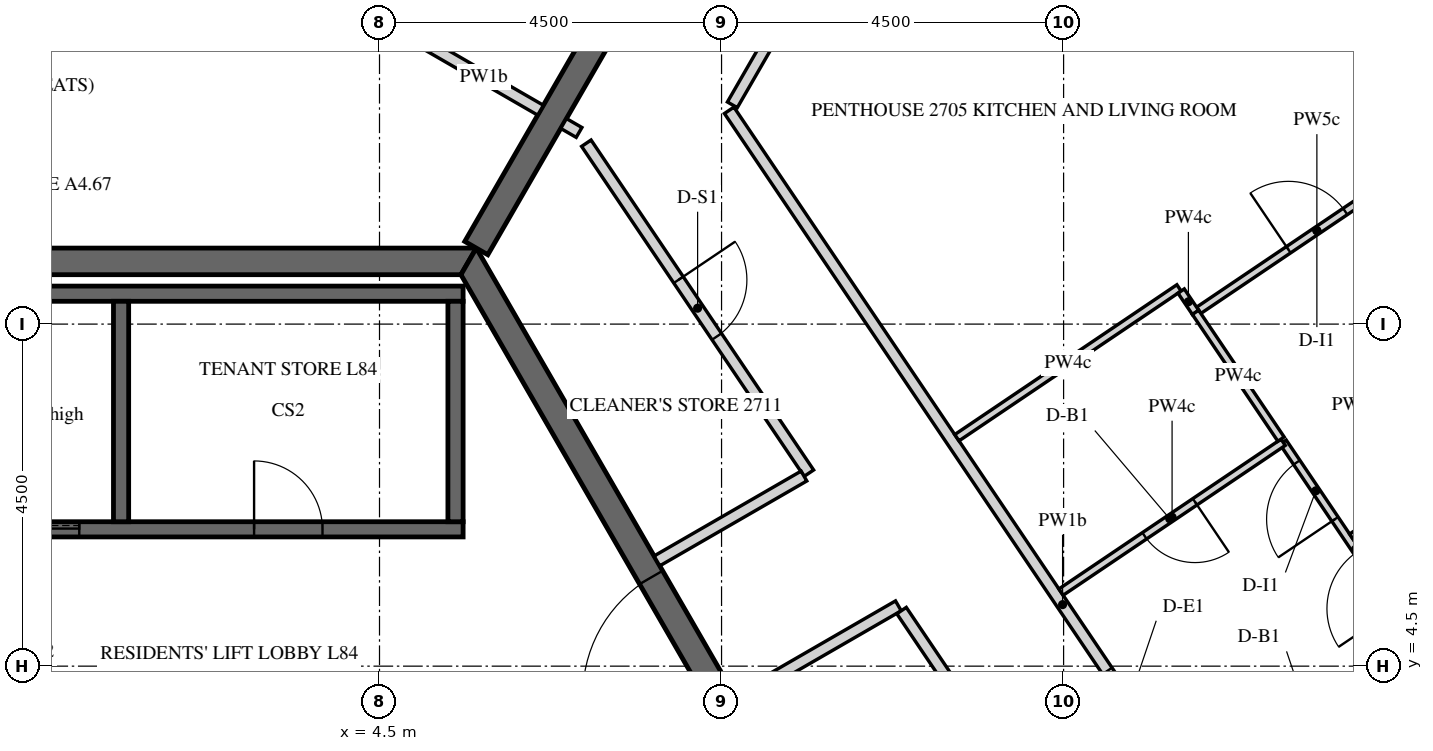
"""IFC4 building model, lengths in metres.
Left out: names, types, materials, properties, quantities, classifications, styles, units other than length and angle.
Written with IfcOpenShell. Run it as: python <this file> out.ifc"""

import sys

from ifc_helpers import new_model, si_unit, direction, frame, frame_2d, origin, place, context, subcontext, project, spatial, polyline, rectangle, outline, extrude, element, fill, save


model = new_model("IFC4")
c1 = context("Model", 3, precision=1e-05, world=origin(), true_north=direction((0.0, 1.0)))
c2 = subcontext(c1, "Body", "Model", "MODEL_VIEW")
j1 = project(units=[si_unit("LENGTHUNIT", "METRE"), si_unit("PLANEANGLEUNIT", "RADIAN")], contexts=[c1])
p1 = place(None, origin())
s1 = spatial("IfcSite", under=j1, at=p1, CompositionType="ELEMENT")
p2 = place(p1, origin())
s2 = spatial("IfcBuilding", under=s1, at=p2, CompositionType="ELEMENT")
p3 = place(p2, frame((0.0, 0.0, 349.5)))
s3 = spatial("IfcBuildingStorey", under=s2, at=p3, CompositionType="ELEMENT", Elevation=349.5)
p4 = place(p3, frame((24.37, 2.811, 0.0), z_axis=(0.0, 0.0, 1.0), x_axis=(-0.559187034749, 0.829041531027, 0.0)))
e1 = element("IfcWall", 1, at=p4, inside=s3, PredefinedType="SOLIDWALL", context=c2, shape_type="SweptSolid", body=[
    extrude(outline(polyline([(0.225, -0.225), (20.506, -0.225), (20.957, 0.225), (-0.225, 0.225), (0.225, -0.225)])), origin(), (0.0, 0.0, 1.0), 3.75),
])
p5 = place(p4, frame((0.325, 0.0, 0.9)))
e2 = element("IfcOpeningElement", 2, at=p5, cuts=e1, PredefinedType="OPENING", context=c2, shape_type="SweptSolid", body=[
    extrude(rectangle(XDim=0.9, YDim=1.5, at=frame_2d((0.45, 0.75))), frame((0.0, 0.235, 0.0), z_axis=(0.0, -1.0, 0.0), x_axis=(1.0, 0.0, 0.0)), (0.0, 0.0, 1.0), 0.47),
])
p6 = place(p4, frame((1.525, 0.0, 0.0)))
e3 = element("IfcOpeningElement", 3, at=p6, cuts=e1, PredefinedType="OPENING", context=c2, shape_type="SweptSolid", body=[
    extrude(rectangle(XDim=1.2, YDim=2.4, at=frame_2d((0.6, 1.2))), frame((0.0, 0.235, 0.0), z_axis=(0.0, -1.0, 0.0), x_axis=(1.0, 0.0, 0.0)), (0.0, 0.0, 1.0), 0.47),
])
p7 = place(p4, frame((3.766, 0.0, 0.9)))
e4 = element("IfcOpeningElement", 4, at=p7, cuts=e1, PredefinedType="OPENING", context=c2, shape_type="SweptSolid", body=[
    extrude(rectangle(XDim=0.9, YDim=1.5, at=frame_2d((0.45, 0.75))), frame((0.0, 0.235, 0.0), z_axis=(0.0, -1.0, 0.0), x_axis=(1.0, 0.0, 0.0)), (0.0, 0.0, 1.0), 0.47),
])
p8 = place(p4, frame((4.966, 0.0, 0.0)))
e5 = element("IfcOpeningElement", 5, at=p8, cuts=e1, PredefinedType="OPENING", context=c2, shape_type="SweptSolid", body=[
    extrude(rectangle(XDim=1.2, YDim=2.4, at=frame_2d((0.6, 1.2))), frame((0.0, 0.235, 0.0), z_axis=(0.0, -1.0, 0.0), x_axis=(1.0, 0.0, 0.0)), (0.0, 0.0, 1.0), 0.47),
])
p9 = place(p4, frame((7.366, 0.0, 0.9)))
e6 = element("IfcOpeningElement", 6, at=p9, cuts=e1, PredefinedType="OPENING", context=c2, shape_type="SweptSolid", body=[
    extrude(rectangle(XDim=0.9, YDim=1.5, at=frame_2d((0.45, 0.75))), frame((0.0, 0.235, 0.0), z_axis=(0.0, -1.0, 0.0), x_axis=(1.0, 0.0, 0.0)), (0.0, 0.0, 1.0), 0.47),
])
p10 = place(p4, frame((8.566, 0.0, 0.0)))
e7 = element("IfcOpeningElement", 7, at=p10, cuts=e1, PredefinedType="OPENING", context=c2, shape_type="SweptSolid", body=[
    extrude(rectangle(XDim=1.2, YDim=2.4, at=frame_2d((0.6, 1.2))), frame((0.0, 0.235, 0.0), z_axis=(0.0, -1.0, 0.0), x_axis=(1.0, 0.0, 0.0)), (0.0, 0.0, 1.0), 0.47),
])
p11 = place(p4, frame((10.966, 0.0, 0.9)))
e8 = element("IfcOpeningElement", 8, at=p11, cuts=e1, PredefinedType="OPENING", context=c2, shape_type="SweptSolid", body=[
    extrude(rectangle(XDim=0.9, YDim=1.5, at=frame_2d((0.45, 0.75))), frame((0.0, 0.235, 0.0), z_axis=(0.0, -1.0, 0.0), x_axis=(1.0, 0.0, 0.0)), (0.0, 0.0, 1.0), 0.47),
])
p12 = place(p4, frame((12.166, 0.0, 0.0)))
e9 = element("IfcOpeningElement", 9, at=p12, cuts=e1, PredefinedType="OPENING", context=c2, shape_type="SweptSolid", body=[
    extrude(rectangle(XDim=1.2, YDim=2.4, at=frame_2d((0.6, 1.2))), frame((0.0, 0.235, 0.0), z_axis=(0.0, -1.0, 0.0), x_axis=(1.0, 0.0, 0.0)), (0.0, 0.0, 1.0), 0.47),
])
p13 = place(p4, frame((14.566, 0.0, 0.9)))
e10 = element("IfcOpeningElement", 10, at=p13, cuts=e1, PredefinedType="OPENING", context=c2, shape_type="SweptSolid", body=[
    extrude(rectangle(XDim=0.9, YDim=1.5, at=frame_2d((0.45, 0.75))), frame((0.0, 0.235, 0.0), z_axis=(0.0, -1.0, 0.0), x_axis=(1.0, 0.0, 0.0)), (0.0, 0.0, 1.0), 0.47),
])
p14 = place(p4, frame((15.766, 0.0, 0.0)))
e11 = element("IfcOpeningElement", 11, at=p14, cuts=e1, PredefinedType="OPENING", context=c2, shape_type="SweptSolid", body=[
    extrude(rectangle(XDim=1.2, YDim=2.4, at=frame_2d((0.6, 1.2))), frame((0.0, 0.235, 0.0), z_axis=(0.0, -1.0, 0.0), x_axis=(1.0, 0.0, 0.0)), (0.0, 0.0, 1.0), 0.47),
])
p15 = place(p4, frame((18.007, 0.0, 0.9)))
e12 = element("IfcOpeningElement", 12, at=p15, cuts=e1, PredefinedType="OPENING", context=c2, shape_type="SweptSolid", body=[
    extrude(rectangle(XDim=0.9, YDim=1.5, at=frame_2d((0.45, 0.75))), frame((0.0, 0.235, 0.0), z_axis=(0.0, -1.0, 0.0), x_axis=(1.0, 0.0, 0.0)), (0.0, 0.0, 1.0), 0.47),
])
p16 = place(p4, frame((19.207, 0.0, 0.0)))
e13 = element("IfcOpeningElement", 13, at=p16, cuts=e1, PredefinedType="OPENING", context=c2, shape_type="SweptSolid", body=[
    extrude(rectangle(XDim=1.2, YDim=2.4, at=frame_2d((0.6, 1.2))), frame((0.0, 0.235, 0.0), z_axis=(0.0, -1.0, 0.0), x_axis=(1.0, 0.0, 0.0)), (0.0, 0.0, 1.0), 0.47),
])
p17 = place(p3, frame((11.345, 0.0, 0.0), z_axis=(0.0, 0.0, 1.0), x_axis=(-0.499995046907, 0.866028263435, 0.0)))
e14 = element("IfcWall", 14, at=p17, inside=s3, PredefinedType="SHEAR", context=c2, shape_type="SweptSolid", body=[
    extrude(outline(polyline([(-0.101, -0.175), (11.446, -0.175), (11.244, 0.175), (0.101, 0.175), (-0.101, -0.175)])), origin(), (0.0, 0.0, 1.0), 3.75),
])
p18 = place(p17, frame((4.744, 0.0, 0.0)))
e15 = element("IfcOpeningElement", 15, at=p18, cuts=e14, PredefinedType="OPENING", context=c2, shape_type="SweptSolid", body=[
    extrude(rectangle(XDim=1.8, YDim=2.4, at=frame_2d((0.9, 1.2))), frame((0.0, 0.185, 0.0), z_axis=(0.0, -1.0, 0.0), x_axis=(1.0, 0.0, 0.0)), (0.0, 0.0, 1.0), 0.37),
])
p19 = place(p3, frame((5.673, 9.825, 0.0), z_axis=(0.0, 0.0, 1.0), x_axis=(-1.0, 0.0, 0.0)))
e16 = element("IfcWall", 16, at=p19, inside=s3, PredefinedType="SHEAR", context=c2, shape_type="SweptSolid", body=[
    extrude(outline(polyline([(-0.101, -0.175), (11.446, -0.175), (11.244, 0.175), (0.101, 0.175), (-0.101, -0.175)])), origin(), (0.0, 0.0, 1.0), 3.75),
])
p20 = place(p3, frame((5.773, 10.0, 0.0), z_axis=(0.0, 0.0, 1.0), x_axis=(0.500007911273, 0.866020836161, 0.0)))
e17 = element("IfcWall", 17, at=p20, inside=s3, PredefinedType="SHEAR", context=c2, shape_type="SweptSolid", body=[
    extrude(rectangle(XDim=14.51, YDim=0.35, at=frame_2d((7.255, 0.0))), origin(), (0.0, 0.0, 1.0), 3.75),
])
p21 = place(p20, frame((6.355, 0.0, 0.0)))
e18 = element("IfcOpeningElement", 18, at=p21, cuts=e17, PredefinedType="OPENING", context=c2, shape_type="SweptSolid", body=[
    extrude(rectangle(XDim=1.8, YDim=2.4, at=frame_2d((0.9, 1.2))), frame((0.0, 0.185, 0.0), z_axis=(0.0, -1.0, 0.0), x_axis=(1.0, 0.0, 0.0)), (0.0, 0.0, 1.0), 0.37),
])
p22 = place(p3, frame((-5.6, 6.3, -0.5), z_axis=(0.0, 0.0, 1.0), x_axis=(1.0, 0.0, 0.0)))
e19 = element("IfcWall", 19, at=p22, inside=s3, PredefinedType="SHEAR", context=c2, shape_type="SweptSolid", body=[
    extrude(rectangle(XDim=11.2, YDim=0.2, at=frame_2d((5.6, 0.0))), origin(), (0.0, 0.0, 1.0), 4.15),
])
p23 = place(p22, frame((8.45, 0.0, 0.5)))
e20 = element("IfcOpeningElement", 20, at=p23, cuts=e19, PredefinedType="OPENING", context=c2, shape_type="SweptSolid", body=[
    extrude(rectangle(XDim=0.9, YDim=2.1, at=frame_2d((0.45, 1.05))), frame((0.0, 0.11, 0.0), z_axis=(0.0, -1.0, 0.0), x_axis=(1.0, 0.0, 0.0)), (0.0, 0.0, 1.0), 0.22),
])
p24 = place(p22, frame((0.65, 0.0, 0.5)))
e21 = element("IfcOpeningElement", 21, at=p24, cuts=e19, PredefinedType="OPENING", context=c2, shape_type="SweptSolid", body=[
    extrude(rectangle(XDim=1.1, YDim=2.1, at=frame_2d((0.55, 1.05))), frame((0.0, 0.11, 0.0), z_axis=(0.0, -1.0, 0.0), x_axis=(1.0, 0.0, 0.0)), (0.0, 0.0, 1.0), 0.22),
])
p25 = place(p22, frame((2.85, 0.0, 0.5)))
e22 = element("IfcOpeningElement", 22, at=p25, cuts=e19, PredefinedType="OPENING", context=c2, shape_type="SweptSolid", body=[
    extrude(rectangle(XDim=1.1, YDim=2.1, at=frame_2d((0.55, 1.05))), frame((0.0, 0.11, 0.0), z_axis=(0.0, -1.0, 0.0), x_axis=(1.0, 0.0, 0.0)), (0.0, 0.0, 1.0), 0.22),
])
p26 = place(p22, frame((5.05, 0.0, 0.5)))
e23 = element("IfcOpeningElement", 23, at=p26, cuts=e19, PredefinedType="OPENING", context=c2, shape_type="SweptSolid", body=[
    extrude(rectangle(XDim=1.1, YDim=2.1, at=frame_2d((0.55, 1.05))), frame((0.0, 0.11, 0.0), z_axis=(0.0, -1.0, 0.0), x_axis=(1.0, 0.0, 0.0)), (0.0, 0.0, 1.0), 0.22),
])
p27 = place(p3, frame((-5.6, 9.4, -0.5), z_axis=(0.0, 0.0, 1.0), x_axis=(1.0, 0.0, 0.0)))
e24 = element("IfcWall", 24, at=p27, inside=s3, PredefinedType="SHEAR", context=c2, shape_type="SweptSolid", body=[
    extrude(rectangle(XDim=11.2, YDim=0.2, at=frame_2d((5.6, 0.0))), origin(), (0.0, 0.0, 1.0), 4.15),
])
for number, where, z_axis, x_axis in (
    (25, (1.1, 6.4, -0.5), (0.0, 0.0, 1.0), (0.0, 1.0, 0.0)),
    (26, (5.5, 6.4, -0.5), (0.0, 0.0, 1.0), (0.0, 1.0, 0.0)),
):
    element("IfcWall", number, at=place(p3, frame(where, z_axis=z_axis, x_axis=x_axis)), inside=s3, PredefinedType="SHEAR", context=c2, shape_type="SweptSolid", body=[
        extrude(rectangle(XDim=2.9, YDim=0.2, at=frame_2d((1.45, 0.0))), origin(), (0.0, 0.0, 1.0), 4.15),
    ])
p28 = place(p3, frame((5.125, 12.677, 0.0), z_axis=(0.0, 0.0, 1.0), x_axis=(0.866013532718, -0.500020560727, 0.0)))
e27 = element("IfcWall", 27, at=p28, inside=s3, PredefinedType="PARTITIONING", context=c2, shape_type="SweptSolid", body=[
    extrude(rectangle(XDim=1.725, YDim=0.15, at=frame_2d((0.863, 0.0))), origin(), (0.0, 0.0, 1.0), 2.82),
])
p29 = place(p3, frame((17.873, -1.193, 0.0), z_axis=(0.0, 0.0, 1.0), x_axis=(-0.559195650252, 0.829035719821, 0.0)))
e28 = element("IfcWall", 28, at=p29, inside=s3, PredefinedType="PARTITIONING", context=c2, shape_type="SweptSolid", body=[
    extrude(rectangle(XDim=15.688, YDim=0.15, at=frame_2d((7.844, 0.0))), origin(), (0.0, 0.0, 1.0), 2.82),
])
p30 = place(p29, frame((5.792, 0.0, 0.0)))
e29 = element("IfcOpeningElement", 29, at=p30, cuts=e28, PredefinedType="OPENING", context=c2, shape_type="SweptSolid", body=[
    extrude(rectangle(XDim=1.0, YDim=2.1, at=frame_2d((0.5, 1.05))), frame((0.0, 0.085, 0.0), z_axis=(0.0, -1.0, 0.0), x_axis=(1.0, 0.0, 0.0)), (0.0, 0.0, 1.0), 0.17),
])
p31 = place(p3, frame((9.142, 11.885, 0.0), z_axis=(0.0, 0.0, 1.0), x_axis=(0.500004822225, 0.866022619654, 0.0)))
e30 = element("IfcWall", 30, at=p31, inside=s3, PredefinedType="PARTITIONING", context=c2, shape_type="SweptSolid", body=[
    extrude(rectangle(XDim=5.339, YDim=0.15, at=frame_2d((2.669, 0.0))), origin(), (0.0, 0.0, 1.0), 2.82),
])
p32 = place(p3, frame((9.2, 4.066, 0.0), z_axis=(0.0, 0.0, 1.0), x_axis=(0.866038240688, 0.499977765172, 0.0)))
e31 = element("IfcWall", 31, at=p32, inside=s3, PredefinedType="PARTITIONING", context=c2, shape_type="SweptSolid", body=[
    extrude(rectangle(XDim=2.456, YDim=0.15, at=frame_2d((1.228, 0.0))), origin(), (0.0, 0.0, 1.0), 2.82),
])
p33 = place(p3, frame((11.368, 5.231, 0.0), z_axis=(0.0, 0.0, 1.0), x_axis=(0.55919388604, -0.829036909803, 0.0)))
e32 = element("IfcWall", 32, at=p33, inside=s3, PredefinedType="PARTITIONING", context=c2, shape_type="SweptSolid", body=[
    extrude(rectangle(XDim=7.922, YDim=0.15, at=frame_2d((3.961, 0.0))), origin(), (0.0, 0.0, 1.0), 2.82),
])
p34 = place(p33, frame((3.511, 0.0, 0.0)))
e33 = element("IfcOpeningElement", 33, at=p34, cuts=e32, PredefinedType="OPENING", context=c2, shape_type="SweptSolid", body=[
    extrude(rectangle(XDim=0.9, YDim=2.1, at=frame_2d((0.45, 1.05))), frame((0.0, 0.085, 0.0), z_axis=(0.0, -1.0, 0.0), x_axis=(1.0, 0.0, 0.0)), (0.0, 0.0, 1.0), 0.17),
])
p35 = place(p3, frame((6.922, 11.639, 0.0), z_axis=(0.0, 0.0, 1.0), x_axis=(0.866254745882, -0.499602557277, 0.0)))
e34 = element("IfcWall", 34, at=p35, inside=s3, PredefinedType="PARTITIONING", context=c2, shape_type="SweptSolid", body=[
    extrude(rectangle(XDim=0.235, YDim=0.15, at=frame_2d((0.118, 0.0))), origin(), (0.0, 0.0, 1.0), 2.82),
])
p36 = place(p3, frame((7.221, 11.38, 0.0), z_axis=(0.0, 0.0, 1.0), x_axis=(0.559200548931, -0.829032415576, 0.0)))
e35 = element("IfcWall", 35, at=p36, inside=s3, PredefinedType="PARTITIONING", context=c2, shape_type="SweptSolid", body=[
    extrude(rectangle(XDim=5.236, YDim=0.15, at=frame_2d((2.618, 0.0))), origin(), (0.0, 0.0, 1.0), 2.82),
])
p37 = place(p36, frame((2.168, 0.0, 0.0)))
e36 = element("IfcOpeningElement", 36, at=p37, cuts=e35, PredefinedType="OPENING", context=c2, shape_type="SweptSolid", body=[
    extrude(rectangle(XDim=0.9, YDim=2.1, at=frame_2d((0.45, 1.05))), frame((0.0, 0.085, 0.0), z_axis=(0.0, -1.0, 0.0), x_axis=(1.0, 0.0, 0.0)), (0.0, 0.0, 1.0), 0.17),
])
p38 = place(p3, frame((10.084, 7.001, 0.0), z_axis=(0.0, 0.0, 1.0), x_axis=(-0.865994457699, -0.500053596362, 0.0)))
e37 = element("IfcWall", 37, at=p38, inside=s3, PredefinedType="PARTITIONING", context=c2, shape_type="SweptSolid", body=[
    extrude(rectangle(XDim=2.234, YDim=0.15, at=frame_2d((1.117, 0.0))), origin(), (0.0, 0.0, 1.0), 2.82),
])
p39 = place(p3, frame((15.278, 9.181, 0.0), z_axis=(0.0, 0.0, 1.0), x_axis=(0.829043350963, 0.559184336534, 0.0)))
e38 = element("IfcWall", 38, at=p39, inside=s3, PredefinedType="PARTITIONING", context=c2, shape_type="SweptSolid", body=[
    extrude(rectangle(XDim=3.75, YDim=0.1, at=frame_2d((1.875, 0.0))), origin(), (0.0, 0.0, 1.0), 2.82),
])
p40 = place(p39, frame((1.425, 0.0, 0.0)))
e39 = element("IfcOpeningElement", 39, at=p40, cuts=e38, PredefinedType="OPENING", context=c2, shape_type="SweptSolid", body=[
    extrude(rectangle(XDim=0.9, YDim=2.1, at=frame_2d((0.45, 1.05))), frame((0.0, 0.06, 0.0), z_axis=(0.0, -1.0, 0.0), x_axis=(1.0, 0.0, 0.0)), (0.0, 0.0, 1.0), 0.12),
])
p41 = place(p3, frame((12.096, 7.505, 0.0), z_axis=(0.0, 0.0, 1.0), x_axis=(0.829065408555, 0.559151632687, 0.0)))
e40 = element("IfcWall", 40, at=p41, inside=s3, PredefinedType="PARTITIONING", context=c2, shape_type="SweptSolid", body=[
    extrude(rectangle(XDim=3.525, YDim=0.1, at=frame_2d((1.762, 0.0))), origin(), (0.0, 0.0, 1.0), 2.82),
])
p42 = place(p3, frame((15.046, 9.435, 0.0), z_axis=(0.0, 0.0, 1.0), x_axis=(0.559141668278, -0.829072128826, 0.0)))
e41 = element("IfcWall", 41, at=p42, inside=s3, PredefinedType="PARTITIONING", context=c2, shape_type="SweptSolid", body=[
    extrude(rectangle(XDim=0.342, YDim=0.1, at=frame_2d((0.171, 0.0))), origin(), (0.0, 0.0, 1.0), 2.82),
])
p43 = place(p3, frame((15.367, 2.655, 0.0), z_axis=(0.0, 0.0, 1.0), x_axis=(0.829033300448, 0.559199237078, 0.0)))
e42 = element("IfcWall", 42, at=p43, inside=s3, PredefinedType="PARTITIONING", context=c2, shape_type="SweptSolid", body=[
    extrude(rectangle(XDim=3.525, YDim=0.1, at=frame_2d((1.763, 0.0))), origin(), (0.0, 0.0, 1.0), 2.82),
])
p44 = place(p43, frame((1.325, 0.0, 0.0)))
e43 = element("IfcOpeningElement", 43, at=p44, cuts=e42, PredefinedType="OPENING", context=c2, shape_type="SweptSolid", body=[
    extrude(rectangle(XDim=0.8, YDim=2.1, at=frame_2d((0.4, 1.05))), frame((0.0, 0.06, 0.0), z_axis=(0.0, -1.0, 0.0), x_axis=(1.0, 0.0, 0.0)), (0.0, 0.0, 1.0), 0.12),
])
p45 = place(p3, frame((18.291, 4.625, 0.0), z_axis=(0.0, 0.0, 1.0), x_axis=(-0.55916115895, 0.82905898362, 0.0)))
e44 = element("IfcWall", 44, at=p45, inside=s3, PredefinedType="PARTITIONING", context=c2, shape_type="SweptSolid", body=[
    extrude(rectangle(XDim=3.404, YDim=0.1, at=frame_2d((1.702, 0.0))), origin(), (0.0, 0.0, 1.0), 2.82),
])
p46 = place(p45, frame((0.762, 0.0, 0.0)))
e45 = element("IfcOpeningElement", 45, at=p46, cuts=e44, PredefinedType="OPENING", context=c2, shape_type="SweptSolid", body=[
    extrude(rectangle(XDim=0.9, YDim=2.1, at=frame_2d((0.45, 1.05))), frame((0.0, 0.06, 0.0), z_axis=(0.0, -1.0, 0.0), x_axis=(1.0, 0.0, 0.0)), (0.0, 0.0, 1.0), 0.12),
])
p47 = place(p45, frame((2.182, 0.0, 0.0)))
e46 = element("IfcOpeningElement", 46, at=p47, cuts=e44, PredefinedType="OPENING", context=c2, shape_type="SweptSolid", body=[
    extrude(rectangle(XDim=0.9, YDim=2.1, at=frame_2d((0.45, 1.05))), frame((0.0, 0.06, 0.0), z_axis=(0.0, -1.0, 0.0), x_axis=(1.0, 0.0, 0.0)), (0.0, 0.0, 1.0), 0.12),
])
p48 = place(p3, frame((16.388, 7.445, 0.0), z_axis=(0.0, 0.0, 1.0), x_axis=(-0.829033300448, -0.559199237078, 0.0)))
e47 = element("IfcWall", 47, at=p48, inside=s3, PredefinedType="PARTITIONING", context=c2, shape_type="SweptSolid", body=[
    extrude(rectangle(XDim=3.525, YDim=0.1, at=frame_2d((1.763, 0.0))), origin(), (0.0, 0.0, 1.0), 2.82),
])
p49 = place(p48, frame((1.4, 0.0, 0.0)))
e48 = element("IfcOpeningElement", 48, at=p49, cuts=e47, PredefinedType="OPENING", context=c2, shape_type="SweptSolid", body=[
    extrude(rectangle(XDim=0.8, YDim=2.1, at=frame_2d((0.4, 1.05))), frame((0.0, 0.06, 0.0), z_axis=(0.0, -1.0, 0.0), x_axis=(1.0, 0.0, 0.0)), (0.0, 0.0, 1.0), 0.12),
])
p50 = place(p3, frame((20.4, 8.294, 0.0), z_axis=(0.0, 0.0, 1.0), x_axis=(-0.829043350963, -0.559184336534, 0.0)))
e49 = element("IfcWall", 49, at=p50, inside=s3, PredefinedType="PARTITIONING", context=c2, shape_type="SweptSolid", body=[
    extrude(rectangle(XDim=3.75, YDim=0.1, at=frame_2d((1.875, 0.0))), origin(), (0.0, 0.0, 1.0), 2.82),
])
p51 = place(p3, frame((15.235, 9.155, 0.0), z_axis=(0.0, 0.0, 1.0), x_axis=(0.559199850123, -0.829032886937, 0.0)))
e50 = element("IfcWall", 50, at=p51, inside=s3, PredefinedType="PARTITIONING", context=c2, shape_type="SweptSolid", body=[
    extrude(rectangle(XDim=2.012, YDim=0.1, at=frame_2d((1.006, 0.0))), origin(), (0.0, 0.0, 1.0), 2.82),
])
p52 = place(p18, origin())
e51 = element("IfcDoor", 51, at=p52, inside=s3, OperationType="DOUBLE_DOOR_SINGLE_SWING", PredefinedType="DOOR", context=c2, shape_type="SweptSolid", body=[
    extrude(rectangle(XDim=1.8, YDim=2.4, at=frame_2d((0.9, 1.2))), frame((0.0, 0.025, 0.0), z_axis=(0.0, -1.0, 0.0), x_axis=(1.0, 0.0, 0.0)), (0.0, 0.0, 1.0), 0.05),
])
fill(e15, e51)
p53 = place(p23, origin())
e52 = element("IfcDoor", 52, at=p53, inside=s3, OperationType="SINGLE_SWING_LEFT", PredefinedType="DOOR", context=c2, shape_type="SweptSolid", body=[
    extrude(rectangle(XDim=0.9, YDim=2.1, at=frame_2d((0.45, 1.05))), frame((0.0, 0.025, 0.0), z_axis=(0.0, -1.0, 0.0), x_axis=(1.0, 0.0, 0.0)), (0.0, 0.0, 1.0), 0.05),
])
fill(e20, e52)
p54 = place(p26, origin())
e53 = element("IfcDoor", 53, at=p54, inside=s3, OperationType="SLIDING_TO_LEFT", PredefinedType="DOOR", context=c2, shape_type="SweptSolid", body=[
    extrude(rectangle(XDim=1.1, YDim=2.1, at=frame_2d((0.55, 1.05))), frame((0.0, 0.025, 0.0), z_axis=(0.0, -1.0, 0.0), x_axis=(1.0, 0.0, 0.0)), (0.0, 0.0, 1.0), 0.05),
])
fill(e23, e53)
p55 = place(p30, origin())
e54 = element("IfcDoor", 54, at=p55, inside=s3, OperationType="SINGLE_SWING_LEFT", PredefinedType="DOOR", context=c2, shape_type="SweptSolid", body=[
    extrude(rectangle(XDim=1.0, YDim=2.1, at=frame_2d((0.5, 1.05))), frame((0.0, 0.025, 0.0), z_axis=(0.0, -1.0, 0.0), x_axis=(1.0, 0.0, 0.0)), (0.0, 0.0, 1.0), 0.05),
])
fill(e29, e54)
p56 = place(p47, origin())
e55 = element("IfcDoor", 55, at=p56, inside=s3, OperationType="SINGLE_SWING_LEFT", PredefinedType="DOOR", context=c2, shape_type="SweptSolid", body=[
    extrude(rectangle(XDim=0.9, YDim=2.1, at=frame_2d((0.45, 1.05))), frame((0.0, 0.025, 0.0), z_axis=(0.0, -1.0, 0.0), x_axis=(1.0, 0.0, 0.0)), (0.0, 0.0, 1.0), 0.05),
])
fill(e46, e55)
p57 = place(p49, origin())
e56 = element("IfcDoor", 56, at=p57, inside=s3, OperationType="SINGLE_SWING_LEFT", PredefinedType="DOOR", context=c2, shape_type="SweptSolid", body=[
    extrude(rectangle(XDim=0.8, YDim=2.1, at=frame_2d((0.4, 1.05))), frame((0.0, 0.025, 0.0), z_axis=(0.0, -1.0, 0.0), x_axis=(1.0, 0.0, 0.0)), (0.0, 0.0, 1.0), 0.05),
])
fill(e48, e56)
p58 = place(p40, origin())
e57 = element("IfcDoor", 57, at=p58, inside=s3, OperationType="SINGLE_SWING_RIGHT", PredefinedType="DOOR", context=c2, shape_type="SweptSolid", body=[
    extrude(rectangle(XDim=0.9, YDim=2.1, at=frame_2d((0.45, 1.05))), frame((0.0, 0.025, 0.0), z_axis=(0.0, -1.0, 0.0), x_axis=(1.0, 0.0, 0.0)), (0.0, 0.0, 1.0), 0.05),
])
fill(e39, e57)
p59 = place(p37, origin())
e58 = element("IfcDoor", 58, at=p59, inside=s3, OperationType="SINGLE_SWING_RIGHT", PredefinedType="DOOR", context=c2, shape_type="SweptSolid", body=[
    extrude(rectangle(XDim=0.9, YDim=2.1, at=frame_2d((0.45, 1.05))), frame((0.0, 0.025, 0.0), z_axis=(0.0, -1.0, 0.0), x_axis=(1.0, 0.0, 0.0)), (0.0, 0.0, 1.0), 0.05),
])
fill(e36, e58)
save(model, sys.argv[1])
